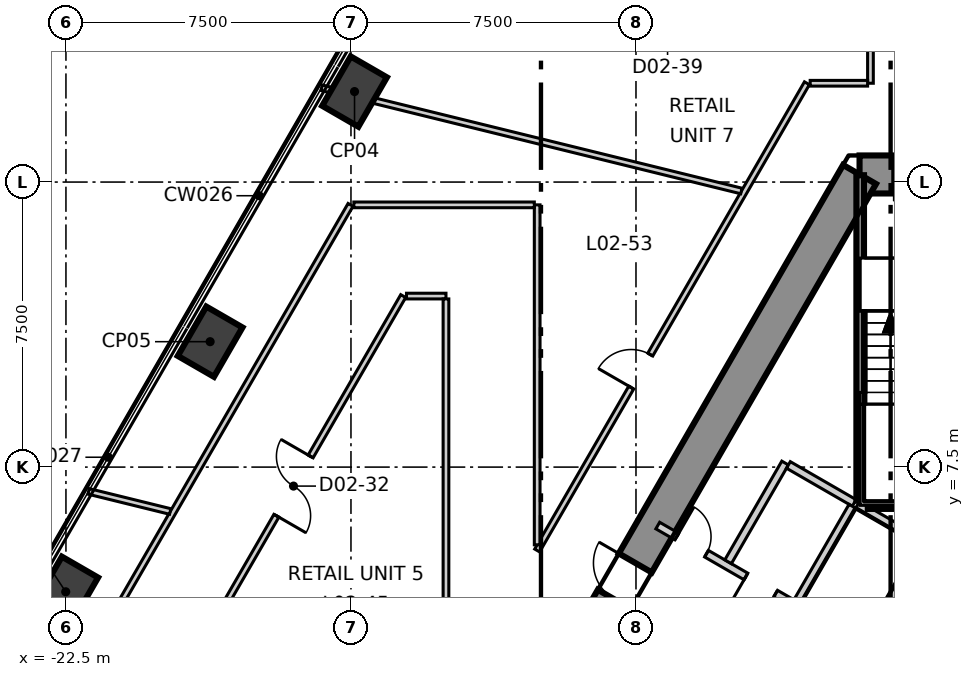
"""IFC4 building model, lengths in metres.
Left out: names, types, materials, properties, quantities, classifications, styles, units other than length and angle.
Written with IfcOpenShell. Run it as: python <this file> out.ifc"""

import sys

from ifc_helpers import new_model, si_unit, direction, frame, frame_2d, origin, origin_2d, place, context, subcontext, project, spatial, polyline, rectangle, outline, extrude, element, fill, save


model = new_model("IFC4")
c1 = context("Model", 3, precision=1e-05, world=origin(), true_north=direction((0.0, 1.0)))
c2 = subcontext(c1, "Body", "Model", "MODEL_VIEW")
j1 = project(units=[si_unit("LENGTHUNIT", "METRE"), si_unit("PLANEANGLEUNIT", "RADIAN")], contexts=[c1])
p1 = place(None, origin())
s1 = spatial("IfcSite", under=j1, at=p1, CompositionType="ELEMENT")
p2 = place(p1, origin())
s2 = spatial("IfcBuilding", under=s1, at=p2, CompositionType="ELEMENT")
p3 = place(p2, frame((0.0, 0.0, 14.5)))
s3 = spatial("IfcBuildingStorey", under=s2, at=p3, CompositionType="ELEMENT", Elevation=14.5)
p4 = place(p3, frame((1.617, 15.2, -0.4), z_axis=(0.0, 0.0, 1.0), x_axis=(-1.0, 0.0, 0.0)))
e1 = element("IfcWall", 1, at=p4, inside=s3, PredefinedType="SHEAR", context=c2, shape_type="SweptSolid", body=[
    extrude(outline(polyline([(-0.288, -0.5), (1.617, -0.5), (3.522, -0.5), (2.945, 0.5), (1.617, 0.5), (0.289, 0.5), (-0.288, -0.5)])), origin(), (0.0, 0.0, 1.0), 5.4),
])
p5 = place(p4, frame((0.917, 0.0, 0.4)))
e2 = element("IfcOpeningElement", 2, at=p5, cuts=e1, PredefinedType="OPENING", context=c2, shape_type="SweptSolid", body=[
    extrude(rectangle(XDim=1.4, YDim=2.1, at=frame_2d((0.7, 1.05))), frame((0.0, 0.51, 0.0), z_axis=(0.0, -1.0, 0.0), x_axis=(1.0, 0.0, 0.0)), (0.0, 0.0, 1.0), 1.02),
])
p6 = place(p3, frame((-1.617, 15.2, -0.4), z_axis=(0.0, 0.0, 1.0), x_axis=(-0.499992141631, -0.866029940768, 0.0)))
e3 = element("IfcWall", 3, at=p6, inside=s3, PredefinedType="SHEAR", context=c2, shape_type="SweptSolid", body=[
    extrude(outline(polyline([(-0.289, -0.499), (1.656, -0.499), (3.601, -0.499), (5.547, -0.499), (7.492, -0.499), (9.437, -0.5), (11.382, -0.5), (13.328, -0.5), (15.273, -0.5), (17.218, -0.5), (19.163, -0.5), (21.109, -0.5), (23.054, -0.5), (24.999, -0.5), (24.422, 0.5), (22.566, 0.5), (20.709, 0.5), (18.853, 0.5), (16.997, 0.5), (15.14, 0.5), (13.284, 0.5), (11.427, 0.5), (9.571, 0.5), (7.715, 0.5), (5.858, 0.5), (4.002, 0.5), (2.146, 0.5), (0.289, 0.5), (-0.289, -0.499)])), origin(), (0.0, 0.0, 1.0), 5.4),
])
p7 = place(p6, frame((11.805, 0.0, 0.4)))
e4 = element("IfcOpeningElement", 4, at=p7, cuts=e3, PredefinedType="OPENING", context=c2, shape_type="SweptSolid", body=[
    extrude(rectangle(XDim=1.1, YDim=2.1, at=frame_2d((0.55, 1.05))), frame((0.0, 0.51, 0.0), z_axis=(0.0, -1.0, 0.0), x_axis=(1.0, 0.0, 0.0)), (0.0, 0.0, 1.0), 1.02),
])
for number, where, z_axis, x_axis in (
    (5, (-14.906, 17.381, -0.4), (0.0, 0.0, 1.0), (0.5, 0.866, 0.0)),
    (6, (-18.706, 10.8, -0.4), (0.0, 0.0, 1.0), (0.5, 0.866, 0.0)),
    (7, (-22.506, 4.219, -0.4), (0.0, 0.0, 1.0), (0.5, 0.866, 0.0)),
):
    element("IfcColumn", number, at=place(p3, frame(where, z_axis=z_axis, x_axis=x_axis)), inside=s3, PredefinedType="COLUMN", context=c2, shape_type="SweptSolid", body=[
        extrude(rectangle(XDim=1.5, YDim=1.1, at=origin_2d()), origin(), (0.0, 0.0, 1.0), 5.4),
    ])
p8 = place(p3, frame((-23.556, -0.4, 0.0), z_axis=(0.0, 0.0, 1.0), x_axis=(0.500011000363, 0.866019052629, 0.0)))
e8 = element("IfcWall", 8, at=p8, inside=s3, PredefinedType="PARTITIONING", context=c2, shape_type="SweptSolid", body=[
    extrude(rectangle(XDim=17.089, YDim=0.15, at=frame_2d((8.545, 0.0))), origin(), (0.0, 0.0, 1.0), 5.0),
])
p9 = place(p3, frame((-10.1, 5.306, 0.0), z_axis=(0.0, 0.0, 1.0), x_axis=(0.500004804517, 0.866022629878, 0.0)))
e9 = element("IfcWall", 9, at=p9, inside=s3, PredefinedType="PARTITIONING", context=c2, shape_type="SweptSolid", body=[
    extrude(rectangle(XDim=14.196, YDim=0.15, at=frame_2d((7.098, 0.0))), origin(), (0.0, 0.0, 1.0), 5.0),
])
p10 = place(p9, frame((4.951, 0.0, 0.0)))
e10 = element("IfcOpeningElement", 10, at=p10, cuts=e9, PredefinedType="OPENING", context=c2, shape_type="SweptSolid", body=[
    extrude(rectangle(XDim=1.0, YDim=2.1, at=frame_2d((0.5, 1.05))), frame((0.0, 0.085, 0.0), z_axis=(0.0, -1.0, 0.0), x_axis=(1.0, 0.0, 0.0)), (0.0, 0.0, 1.0), 0.17),
])
p11 = place(p3, frame((-21.904, 6.861, 0.0), z_axis=(0.0, 0.0, 1.0), x_axis=(0.970980584994, -0.239158323219, 0.0)))
e11 = element("IfcWall", 11, at=p11, inside=s3, PredefinedType="PARTITIONING", context=c2, shape_type="SweptSolid", body=[
    extrude(rectangle(XDim=2.212, YDim=0.15, at=frame_2d((1.106, 0.0))), origin(), (0.0, 0.0, 1.0), 5.0),
])
p12 = place(p3, frame((-10.1, 5.456, 0.0), z_axis=(0.0, 0.0, 1.0), x_axis=(0.0, 1.0, 0.0)))
e12 = element("IfcWall", 12, at=p12, inside=s3, PredefinedType="PARTITIONING", context=c2, shape_type="SweptSolid", body=[
    extrude(rectangle(XDim=8.944, YDim=0.15, at=frame_2d((4.472, 0.0))), origin(), (0.0, 0.0, 1.0), 5.0),
])
p13 = place(p3, frame((-14.924, 14.4, 0.0), z_axis=(0.0, 0.0, 1.0), x_axis=(1.0, 0.0, 0.0)))
e13 = element("IfcWall", 13, at=p13, inside=s3, PredefinedType="PARTITIONING", context=c2, shape_type="SweptSolid", body=[
    extrude(rectangle(XDim=4.749, YDim=0.15, at=frame_2d((2.375, 0.0))), origin(), (0.0, 0.0, 1.0), 5.0),
])
p14 = place(p3, frame((-15.772, 17.482, 0.0), z_axis=(0.0, 0.0, 1.0), x_axis=(0.971054639106, -0.2388574635, 0.0)))
e14 = element("IfcWall", 14, at=p14, inside=s3, PredefinedType="PARTITIONING", context=c2, shape_type="SweptSolid", body=[
    extrude(rectangle(XDim=11.375, YDim=0.15, at=frame_2d((5.688, 0.0))), origin(), (0.0, 0.0, 1.0), 5.0),
])
p15 = place(p3, frame((-1.33, 17.6, 0.0), z_axis=(0.0, 0.0, 1.0), x_axis=(0.0, 1.0, 0.0)))
e15 = element("IfcWall", 15, at=p15, inside=s3, PredefinedType="PARTITIONING", context=c2, shape_type="SweptSolid", body=[
    extrude(rectangle(XDim=2.0, YDim=0.15, at=frame_2d((1.0, 0.0))), origin(), (0.0, 0.0, 1.0), 4.15),
])
p16 = place(p3, frame((-2.916, 17.6, 0.0), z_axis=(0.0, 0.0, 1.0), x_axis=(1.0, 0.0, 0.0)))
e16 = element("IfcWall", 16, at=p16, inside=s3, PredefinedType="PARTITIONING", context=c2, shape_type="SweptSolid", body=[
    extrude(rectangle(XDim=1.511, YDim=0.15, at=frame_2d((0.755, 0.0))), origin(), (0.0, 0.0, 1.0), 5.0),
])
p17 = place(p3, frame((-19.399, 2.0, 0.0), z_axis=(0.0, 0.0, 1.0), x_axis=(0.500027479704, 0.866009537788, 0.0)))
e17 = element("IfcWall", 17, at=p17, inside=s3, PredefinedType="PARTITIONING", context=c2, shape_type="SweptSolid", body=[
    extrude(rectangle(XDim=11.547, YDim=0.15, at=frame_2d((5.773, 0.0))), origin(), (0.0, 0.0, 1.0), 5.0),
])
p18 = place(p17, frame((4.874, 0.0, 0.0)))
e18 = element("IfcOpeningElement", 18, at=p18, cuts=e17, PredefinedType="OPENING", context=c2, shape_type="SweptSolid", body=[
    extrude(rectangle(XDim=1.8, YDim=2.1, at=frame_2d((0.9, 1.05))), frame((0.0, 0.085, 0.0), z_axis=(0.0, -1.0, 0.0), x_axis=(1.0, 0.0, 0.0)), (0.0, 0.0, 1.0), 0.17),
])
p19 = place(p3, frame((-13.539, 12.0, 0.0), z_axis=(0.0, 0.0, 1.0), x_axis=(1.0, 0.0, 0.0)))
e19 = element("IfcWall", 19, at=p19, inside=s3, PredefinedType="PARTITIONING", context=c2, shape_type="SweptSolid", body=[
    extrude(rectangle(XDim=1.039, YDim=0.15, at=frame_2d((0.52, 0.0))), origin(), (0.0, 0.0, 1.0), 5.0),
])
p20 = place(p3, frame((-12.5, 2.749, 0.0), z_axis=(0.0, 0.0, 1.0), x_axis=(0.0, 1.0, 0.0)))
e20 = element("IfcWall", 20, at=p20, inside=s3, PredefinedType="PARTITIONING", context=c2, shape_type="SweptSolid", body=[
    extrude(rectangle(XDim=9.176, YDim=0.15, at=frame_2d((4.588, 0.0))), origin(), (0.0, 0.0, 1.0), 5.0),
])
p21 = place(p3, frame((-6.927, 5.962, 0.0), z_axis=(0.0, 0.0, 1.0), x_axis=(0.866065051207, -0.49993132236, 0.0)))
e21 = element("IfcWall", 21, at=p21, inside=s3, PredefinedType="SOLIDWALL", context=c2, shape_type="SweptSolid", body=[
    extrude(rectangle(XDim=4.182, YDim=0.2, at=frame_2d((2.091, 0.0))), origin(), (0.0, 0.0, 1.0), 5.0),
])
p22 = place(p21, frame((2.68, 0.0, 0.0)))
e22 = element("IfcOpeningElement", 22, at=p22, cuts=e21, PredefinedType="OPENING", context=c2, shape_type="SweptSolid", body=[
    extrude(rectangle(XDim=0.9, YDim=2.1, at=frame_2d((0.45, 1.05))), frame((0.0, 0.11, 0.0), z_axis=(0.0, -1.0, 0.0), x_axis=(1.0, 0.0, 0.0)), (0.0, 0.0, 1.0), 0.22),
])
p23 = place(p21, frame((0.58, 0.0, 0.0)))
e23 = element("IfcOpeningElement", 23, at=p23, cuts=e21, PredefinedType="OPENING", context=c2, shape_type="SweptSolid", body=[
    extrude(rectangle(XDim=0.9, YDim=2.1, at=frame_2d((0.45, 1.05))), frame((0.0, 0.11, 0.0), z_axis=(0.0, -1.0, 0.0), x_axis=(1.0, 0.0, 0.0)), (0.0, 0.0, 1.0), 0.22),
])
p24 = place(p3, frame((-5.076, 5.009, 0.0), z_axis=(0.0, 0.0, 1.0), x_axis=(0.50002537861, 0.866010750942, 0.0)))
e24 = element("IfcWall", 24, at=p24, inside=s3, PredefinedType="SOLIDWALL", context=c2, shape_type="SweptSolid", body=[
    extrude(rectangle(XDim=3.0, YDim=0.2, at=frame_2d((1.5, 0.0))), origin(), (0.0, 0.0, 1.0), 5.0),
])
p25 = place(p3, frame((-3.489, 7.557, 0.0), z_axis=(0.0, 0.0, 1.0), x_axis=(0.866010750942, -0.50002537861, 0.0)))
e25 = element("IfcWall", 25, at=p25, inside=s3, PredefinedType="SOLIDWALL", context=c2, shape_type="SweptSolid", body=[
    extrude(rectangle(XDim=2.0, YDim=0.2, at=frame_2d((1.0, 0.0))), origin(), (0.0, 0.0, 1.0), 5.0),
])
p26 = place(p3, frame((-3.257, 3.959, 0.0), z_axis=(0.0, 0.0, 1.0), x_axis=(0.50012328804, 0.865954211699, 0.0)))
e26 = element("IfcWall", 26, at=p26, inside=s3, PredefinedType="SOLIDWALL", context=c2, shape_type="SweptSolid", body=[
    extrude(rectangle(XDim=2.9, YDim=0.2, at=frame_2d((1.45, 0.0))), origin(), (0.0, 0.0, 1.0), 5.0),
])
p27 = place(p3, frame((-1.67, 6.507, 0.0), z_axis=(0.0, 0.0, 1.0), x_axis=(0.865941441609, -0.500145398563, 0.0)))
e27 = element("IfcWall", 27, at=p27, inside=s3, PredefinedType="SOLIDWALL", context=c2, shape_type="SweptSolid", body=[
    extrude(rectangle(XDim=1.815, YDim=0.2, at=frame_2d((0.908, 0.0))), origin(), (0.0, 0.0, 1.0), 5.0),
])
p28 = place(p3, frame((-1.438, 2.909, 0.0), z_axis=(0.0, 0.0, 1.0), x_axis=(0.499829630636, 0.866123744241, 0.0)))
e28 = element("IfcWall", 28, at=p28, inside=s3, PredefinedType="SOLIDWALL", context=c2, shape_type="SweptSolid", body=[
    extrude(rectangle(XDim=2.761, YDim=0.2, at=frame_2d((1.38, 0.0))), origin(), (0.0, 0.0, 1.0), 5.0),
])
p29 = place(p3, frame((-1.4, 6.5, 0.0), z_axis=(0.0, 0.0, 1.0), x_axis=(1.0, 0.0, 0.0)))
e29 = element("IfcWall", 29, at=p29, inside=s3, PredefinedType="SOLIDWALL", context=c2, shape_type="SweptSolid", body=[
    extrude(rectangle(XDim=2.8, YDim=0.2, at=frame_2d((1.4, 0.0))), origin(), (0.0, 0.0, 1.0), 5.0),
])
p30 = place(p3, frame((-1.6, 6.615, 0.0), z_axis=(0.0, 0.0, 1.0), x_axis=(0.0, 1.0, 0.0)))
e30 = element("IfcWall", 30, at=p30, inside=s3, PredefinedType="SOLIDWALL", context=c2, shape_type="SweptSolid", body=[
    extrude(rectangle(XDim=8.565, YDim=0.2, at=frame_2d((4.282, 0.0))), origin(), (0.0, 0.0, 1.0), 5.0),
])
p31 = place(p22, origin())
e31 = element("IfcDoor", 31, at=p31, inside=s3, OperationType="SINGLE_SWING_LEFT", PredefinedType="DOOR", context=c2, shape_type="SweptSolid", body=[
    extrude(rectangle(XDim=0.9, YDim=2.1, at=frame_2d((0.45, 1.05))), frame((0.0, 0.025, 0.0), z_axis=(0.0, -1.0, 0.0), x_axis=(1.0, 0.0, 0.0)), (0.0, 0.0, 1.0), 0.05),
])
fill(e22, e31)
p32 = place(p18, origin())
e32 = element("IfcDoor", 32, at=p32, inside=s3, OperationType="DOUBLE_DOOR_SINGLE_SWING", PredefinedType="DOOR", context=c2, shape_type="SweptSolid", body=[
    extrude(rectangle(XDim=1.8, YDim=2.1, at=frame_2d((0.9, 1.05))), frame((0.0, 0.025, 0.0), z_axis=(0.0, -1.0, 0.0), x_axis=(1.0, 0.0, 0.0)), (0.0, 0.0, 1.0), 0.05),
])
fill(e18, e32)
p33 = place(p10, origin())
e33 = element("IfcDoor", 33, at=p33, inside=s3, OperationType="SINGLE_SWING_RIGHT", PredefinedType="DOOR", context=c2, shape_type="SweptSolid", body=[
    extrude(rectangle(XDim=1.0, YDim=2.1, at=frame_2d((0.5, 1.05))), frame((0.0, 0.025, 0.0), z_axis=(0.0, -1.0, 0.0), x_axis=(1.0, 0.0, 0.0)), (0.0, 0.0, 1.0), 0.05),
])
fill(e10, e33)
p34 = place(p7, origin())
e34 = element("IfcDoor", 34, at=p34, inside=s3, OperationType="SINGLE_SWING_LEFT", PredefinedType="DOOR", context=c2, shape_type="SweptSolid", body=[
    extrude(rectangle(XDim=1.1, YDim=2.1, at=frame_2d((0.55, 1.05))), frame((0.0, 0.025, 0.0), z_axis=(0.0, -1.0, 0.0), x_axis=(1.0, 0.0, 0.0)), (0.0, 0.0, 1.0), 0.05),
])
fill(e4, e34)
p35 = place(p23, origin())
e35 = element("IfcDoor", 35, at=p35, inside=s3, OperationType="SINGLE_SWING_RIGHT", PredefinedType="DOOR", context=c2, shape_type="SweptSolid", body=[
    extrude(rectangle(XDim=0.9, YDim=2.1, at=frame_2d((0.45, 1.05))), frame((0.0, 0.025, 0.0), z_axis=(0.0, -1.0, 0.0), x_axis=(1.0, 0.0, 0.0)), (0.0, 0.0, 1.0), 0.05),
])
fill(e23, e35)
save(model, sys.argv[1])
